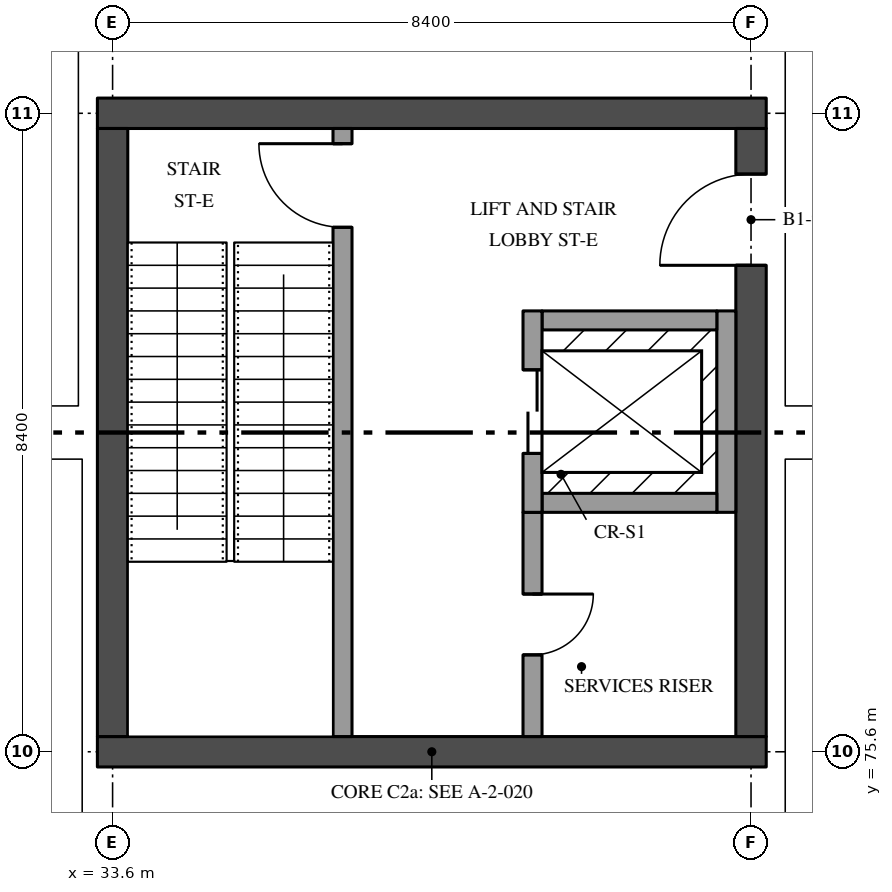
"""IFC4 building model, lengths in metres.
Left out: names, types, materials, properties, quantities, classifications, styles, units other than length and angle.
Written with IfcOpenShell. Run it as: python <this file> out.ifc"""

import sys

from ifc_helpers import new_model, si_unit, direction, frame, frame_2d, origin, place, context, subcontext, project, spatial, rectangle, extrude, element, fill, save


model = new_model("IFC4")
c1 = context("Model", 3, precision=1e-05, world=origin(), true_north=direction((0.0, 1.0)))
c2 = subcontext(c1, "Body", "Model", "MODEL_VIEW")
j1 = project(units=[si_unit("LENGTHUNIT", "METRE"), si_unit("PLANEANGLEUNIT", "RADIAN")], contexts=[c1])
p1 = place(None, origin())
s1 = spatial("IfcSite", under=j1, at=p1, CompositionType="ELEMENT")
p2 = place(p1, origin())
s2 = spatial("IfcBuilding", under=s1, at=p2, CompositionType="ELEMENT")
p3 = place(p2, frame((0.0, 0.0, -4.5)))
s3 = spatial("IfcBuildingStorey", under=s2, at=p3, CompositionType="ELEMENT", Elevation=-4.5)
for number, where, z_axis, x_axis in (
    (1, (33.4, 75.6, 0.0), (0.0, 0.0, 1.0), (1.0, 0.0, 0.0)),
    (2, (33.4, 84.0, 0.0), (0.0, 0.0, 1.0), (1.0, 0.0, 0.0)),
):
    element("IfcWall", number, at=place(p3, frame(where, z_axis=z_axis, x_axis=x_axis)), inside=s3, PredefinedType="SHEAR", context=c2, shape_type="SweptSolid", body=[
        extrude(rectangle(XDim=8.8, YDim=0.4, at=frame_2d((4.4, 0.0))), origin(), (0.0, 0.0, 1.0), 4.05),
    ])
p4 = place(p3, frame((33.6, 75.8, 0.0), z_axis=(0.0, 0.0, 1.0), x_axis=(0.0, 1.0, 0.0)))
e3 = element("IfcWall", 3, at=p4, inside=s3, PredefinedType="SHEAR", context=c2, shape_type="SweptSolid", body=[
    extrude(rectangle(XDim=8.0, YDim=0.4, at=frame_2d((4.0, 0.0))), origin(), (0.0, 0.0, 1.0), 4.05),
])
p5 = place(p3, frame((42.0, 75.8, 0.0), z_axis=(0.0, 0.0, 1.0), x_axis=(0.0, 1.0, 0.0)))
e4 = element("IfcWall", 4, at=p5, inside=s3, PredefinedType="SHEAR", context=c2, shape_type="SweptSolid", body=[
    extrude(rectangle(XDim=8.0, YDim=0.4, at=frame_2d((4.0, 0.0))), origin(), (0.0, 0.0, 1.0), 4.05),
])
p6 = place(p5, frame((6.2, 0.0, 0.0)))
e5 = element("IfcOpeningElement", 5, at=p6, cuts=e4, PredefinedType="OPENING", context=c2, shape_type="SweptSolid", body=[
    extrude(rectangle(XDim=1.2, YDim=2.1, at=frame_2d((0.6, 1.05))), frame((0.0, 0.21, 0.0), z_axis=(0.0, -1.0, 0.0), x_axis=(1.0, 0.0, 0.0)), (0.0, 0.0, 1.0), 0.42),
])
p7 = place(p3, frame((36.625, 83.8, 0.0), z_axis=(0.0, 0.0, 1.0), x_axis=(0.0, -1.0, 0.0)))
e6 = element("IfcWall", 6, at=p7, inside=s3, PredefinedType="SOLIDWALL", context=c2, shape_type="SweptSolid", body=[
    extrude(rectangle(XDim=8.0, YDim=0.25, at=frame_2d((4.0, 0.0))), origin(), (0.0, 0.0, 1.0), 4.05),
])
p8 = place(p7, frame((0.2, 0.0, 0.0)))
e7 = element("IfcOpeningElement", 7, at=p8, cuts=e6, PredefinedType="OPENING", context=c2, shape_type="SweptSolid", body=[
    extrude(rectangle(XDim=1.1, YDim=2.1, at=frame_2d((0.55, 1.05))), frame((0.0, 0.135, 0.0), z_axis=(0.0, -1.0, 0.0), x_axis=(1.0, 0.0, 0.0)), (0.0, 0.0, 1.0), 0.27),
])
p9 = place(p3, frame((39.125, 78.75, 0.0), z_axis=(0.0, 0.0, 1.0), x_axis=(0.0, -1.0, 0.0)))
e8 = element("IfcWall", 8, at=p9, inside=s3, PredefinedType="SOLIDWALL", context=c2, shape_type="SweptSolid", body=[
    extrude(rectangle(XDim=2.95, YDim=0.25, at=frame_2d((1.475, 0.0))), origin(), (0.0, 0.0, 1.0), 4.05),
])
p10 = place(p9, frame((1.075, 0.0, 0.0)))
e9 = element("IfcOpeningElement", 9, at=p10, cuts=e8, PredefinedType="OPENING", context=c2, shape_type="SweptSolid", body=[
    extrude(rectangle(XDim=0.8, YDim=2.1, at=frame_2d((0.4, 1.05))), frame((0.0, 0.135, 0.0), z_axis=(0.0, -1.0, 0.0), x_axis=(1.0, 0.0, 0.0)), (0.0, 0.0, 1.0), 0.27),
])
p11 = place(p3, frame((41.675, 78.75, 0.0), z_axis=(0.0, 0.0, 1.0), x_axis=(0.0, 1.0, 0.0)))
e10 = element("IfcWall", 10, at=p11, inside=s3, PredefinedType="SOLIDWALL", context=c2, shape_type="SweptSolid", body=[
    extrude(rectangle(XDim=2.65, YDim=0.25, at=frame_2d((1.325, 0.0))), origin(), (0.0, 0.0, 1.0), 4.05),
])
for number, where, z_axis, x_axis in (
    (11, (39.25, 81.275, 0.0), (0.0, 0.0, 1.0), (1.0, 0.0, 0.0)),
    (12, (39.25, 78.875, 0.0), (0.0, 0.0, 1.0), (1.0, 0.0, 0.0)),
):
    element("IfcWall", number, at=place(p3, frame(where, z_axis=z_axis, x_axis=x_axis)), inside=s3, PredefinedType="SOLIDWALL", context=c2, shape_type="SweptSolid", body=[
        extrude(rectangle(XDim=2.3, YDim=0.25, at=frame_2d((1.15, 0.0))), origin(), (0.0, 0.0, 1.0), 4.05),
    ])
p12 = place(p3, frame((39.125, 78.75, 0.0), z_axis=(0.0, 0.0, 1.0), x_axis=(0.0, 1.0, 0.0)))
e13 = element("IfcWall", 13, at=p12, inside=s3, PredefinedType="SOLIDWALL", context=c2, shape_type="SweptSolid", body=[
    extrude(rectangle(XDim=2.65, YDim=0.25, at=frame_2d((1.325, 0.0))), origin(), (0.0, 0.0, 1.0), 4.05),
])
p13 = place(p12, frame((0.775, 0.0, 0.0)))
e14 = element("IfcOpeningElement", 14, at=p13, cuts=e13, PredefinedType="OPENING", context=c2, shape_type="SweptSolid", body=[
    extrude(rectangle(XDim=1.1, YDim=2.1, at=frame_2d((0.55, 1.05))), frame((0.0, 0.135, 0.0), z_axis=(0.0, -1.0, 0.0), x_axis=(1.0, 0.0, 0.0)), (0.0, 0.0, 1.0), 0.27),
])
p14 = place(p6, origin())
e15 = element("IfcDoor", 15, at=p14, inside=s3, OperationType="SINGLE_SWING_RIGHT", PredefinedType="DOOR", context=c2, shape_type="SweptSolid", body=[
    extrude(rectangle(XDim=1.2, YDim=2.1, at=frame_2d((0.6, 1.05))), frame((0.0, 0.035, 0.0), z_axis=(0.0, -1.0, 0.0), x_axis=(1.0, 0.0, 0.0)), (0.0, 0.0, 1.0), 0.07),
])
fill(e5, e15)
p15 = place(p10, origin())
e16 = element("IfcDoor", 16, at=p15, inside=s3, OperationType="SINGLE_SWING_RIGHT", PredefinedType="DOOR", context=c2, shape_type="SweptSolid", body=[
    extrude(rectangle(XDim=0.8, YDim=2.1, at=frame_2d((0.4, 1.05))), frame((0.0, 0.035, 0.0), z_axis=(0.0, -1.0, 0.0), x_axis=(1.0, 0.0, 0.0)), (0.0, 0.0, 1.0), 0.07),
])
fill(e9, e16)
p16 = place(p8, frame((1.1, 0.0, 0.0), z_axis=(0.0, 0.0, 1.0), x_axis=(-1.0, 0.0, 0.0)))
e17 = element("IfcDoor", 17, at=p16, inside=s3, OperationType="SINGLE_SWING_LEFT", PredefinedType="DOOR", context=c2, shape_type="SweptSolid", body=[
    extrude(rectangle(XDim=1.1, YDim=2.1, at=frame_2d((0.55, 1.05))), frame((0.0, 0.035, 0.0), z_axis=(0.0, -1.0, 0.0), x_axis=(1.0, 0.0, 0.0)), (0.0, 0.0, 1.0), 0.07),
])
fill(e7, e17)
p17 = place(p13, origin())
e18 = element("IfcDoor", 18, at=p17, inside=s3, OperationType="DOUBLE_DOOR_SLIDING", PredefinedType="DOOR", context=c2, shape_type="SweptSolid", body=[
    extrude(rectangle(XDim=1.1, YDim=2.1, at=frame_2d((0.55, 1.05))), frame((0.0, 0.04, 0.0), z_axis=(0.0, -1.0, 0.0), x_axis=(1.0, 0.0, 0.0)), (0.0, 0.0, 1.0), 0.08),
])
fill(e14, e18)
save(model, sys.argv[1])
